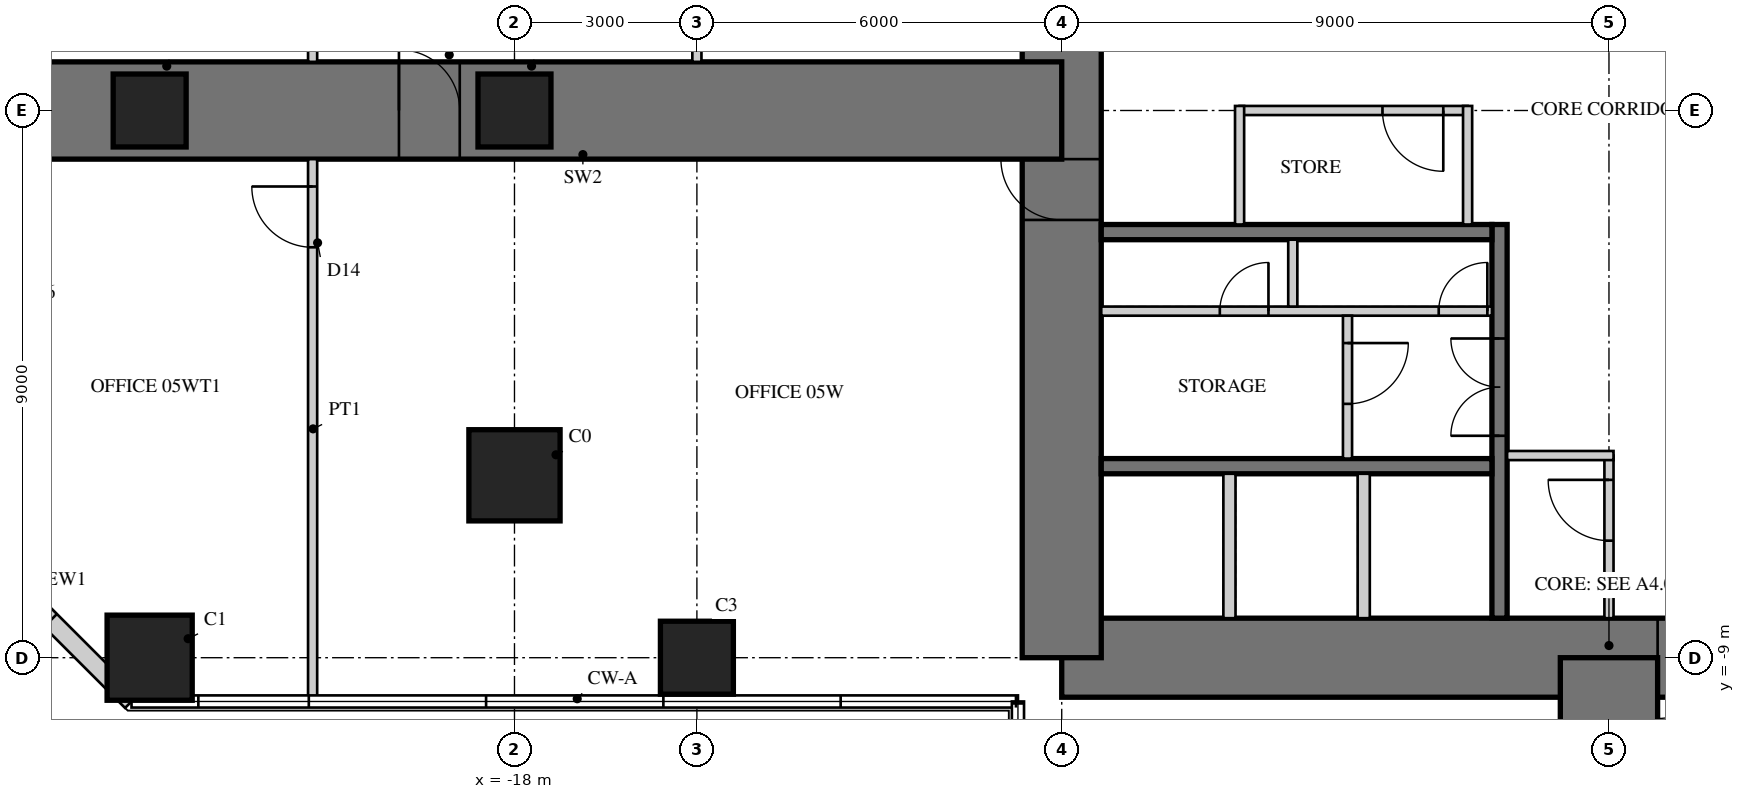
"""IFC4 building model, lengths in metres.
Left out: names, types, materials, properties, quantities, classifications, styles, units other than length and angle.
Written with IfcOpenShell. Run it as: python <this file> out.ifc"""

import sys

from ifc_helpers import new_model, si_unit, direction, frame, frame_2d, origin, origin_2d, place, context, subcontext, project, spatial, rectangle, extrude, element, fill, save


model = new_model("IFC4")
c1 = context("Model", 3, precision=1e-05, world=origin(), true_north=direction((0.0, 1.0)))
c2 = subcontext(c1, "Body", "Model", "MODEL_VIEW")
j1 = project(units=[si_unit("LENGTHUNIT", "METRE"), si_unit("PLANEANGLEUNIT", "RADIAN")], contexts=[c1])
p1 = place(None, origin())
s1 = spatial("IfcSite", under=j1, at=p1, CompositionType="ELEMENT")
p2 = place(p1, origin())
s2 = spatial("IfcBuilding", under=s1, at=p2, CompositionType="ELEMENT")
p3 = place(p2, frame((0.0, 0.0, 23.5)))
s3 = spatial("IfcBuildingStorey", under=s2, at=p3, CompositionType="ELEMENT", Elevation=23.5)
p4 = place(p3, frame((-9.0, -9.0, 0.0), z_axis=(0.0, 0.0, 1.0), x_axis=(1.0, 0.0, 0.0)))
e1 = element("IfcWall", 1, at=p4, inside=s3, PredefinedType="SHEAR", context=c2, shape_type="SweptSolid", body=[
    extrude(rectangle(XDim=18.0, YDim=1.3, at=frame_2d((9.0, 0.0))), origin(), (0.0, 0.0, 1.0), 4.0),
])
p5 = place(p4, frame((9.8, 0.0, 0.0)))
e2 = element("IfcOpeningElement", 2, at=p5, cuts=e1, PredefinedType="OPENING", context=c2, shape_type="SweptSolid", body=[
    extrude(rectangle(XDim=1.0, YDim=2.4, at=frame_2d((0.5, 1.2))), frame((0.0, 0.66, 0.0), z_axis=(0.0, -1.0, 0.0), x_axis=(1.0, 0.0, 0.0)), (0.0, 0.0, 1.0), 1.32),
])
p6 = place(p3, frame((-9.0, 9.0, 0.0), z_axis=(0.0, 0.0, 1.0), x_axis=(0.0, -1.0, 0.0)))
e3 = element("IfcWall", 3, at=p6, inside=s3, PredefinedType="SHEAR", context=c2, shape_type="SweptSolid", body=[
    extrude(rectangle(XDim=18.0, YDim=1.3, at=frame_2d((9.0, 0.0))), origin(), (0.0, 0.0, 1.0), 4.0),
])
p7 = place(p6, frame((9.8, 0.0, 0.0)))
e4 = element("IfcOpeningElement", 4, at=p7, cuts=e3, PredefinedType="OPENING", context=c2, shape_type="SweptSolid", body=[
    extrude(rectangle(XDim=1.0, YDim=2.4, at=frame_2d((0.5, 1.2))), frame((0.0, 0.66, 0.0), z_axis=(0.0, -1.0, 0.0), x_axis=(1.0, 0.0, 0.0)), (0.0, 0.0, 1.0), 1.32),
])
p8 = place(p3, frame((-1.8, -1.875, 0.0), z_axis=(0.0, 0.0, 1.0), x_axis=(0.0, -1.0, 0.0)))
e5 = element("IfcWall", 5, at=p8, inside=s3, PredefinedType="SHEAR", context=c2, shape_type="SweptSolid", body=[
    extrude(rectangle(XDim=6.475, YDim=0.25, at=frame_2d((3.238, 0.0))), origin(), (0.0, 0.0, 1.0), 4.0),
])
p9 = place(p8, frame((1.875, 0.0, 0.0)))
e6 = element("IfcOpeningElement", 6, at=p9, cuts=e5, PredefinedType="OPENING", context=c2, shape_type="SweptSolid", body=[
    extrude(rectangle(XDim=1.6, YDim=2.4, at=frame_2d((0.8, 1.2))), frame((0.0, 0.135, 0.0), z_axis=(0.0, -1.0, 0.0), x_axis=(1.0, 0.0, 0.0)), (0.0, 0.0, 1.0), 0.27),
])
for number, where, z_axis, x_axis in (
    (7, (-1.925, -2.0, 0.0), (0.0, 0.0, 1.0), (-1.0, 0.0, 0.0)),
    (8, (-1.925, -5.85, 0.0), (0.0, 0.0, 1.0), (-1.0, 0.0, 0.0)),
):
    element("IfcWall", number, at=place(p3, frame(where, z_axis=z_axis, x_axis=x_axis)), inside=s3, PredefinedType="SHEAR", context=c2, shape_type="SweptSolid", body=[
        extrude(rectangle(XDim=6.425, YDim=0.25, at=frame_2d((3.212, 0.0))), origin(), (0.0, 0.0, 1.0), 4.0),
    ])
p10 = place(p3, frame((-1.925, -3.3, 0.0), z_axis=(0.0, 0.0, 1.0), x_axis=(-1.0, 0.0, 0.0)))
e9 = element("IfcWall", 9, at=p10, inside=s3, PredefinedType="PARTITIONING", context=c2, shape_type="SweptSolid", body=[
    extrude(rectangle(XDim=6.425, YDim=0.15, at=frame_2d((3.212, 0.0))), origin(), (0.0, 0.0, 1.0), 4.0),
])
p11 = place(p10, frame((0.075, 0.0, 0.0)))
e10 = element("IfcOpeningElement", 10, at=p11, cuts=e9, PredefinedType="OPENING", context=c2, shape_type="SweptSolid", body=[
    extrude(rectangle(XDim=0.8, YDim=2.1, at=frame_2d((0.4, 1.05))), frame((0.0, 0.085, 0.0), z_axis=(0.0, -1.0, 0.0), x_axis=(1.0, 0.0, 0.0)), (0.0, 0.0, 1.0), 0.17),
])
p12 = place(p10, frame((3.675, 0.0, 0.0)))
e11 = element("IfcOpeningElement", 11, at=p12, cuts=e9, PredefinedType="OPENING", context=c2, shape_type="SweptSolid", body=[
    extrude(rectangle(XDim=0.8, YDim=2.1, at=frame_2d((0.4, 1.05))), frame((0.0, 0.085, 0.0), z_axis=(0.0, -1.0, 0.0), x_axis=(1.0, 0.0, 0.0)), (0.0, 0.0, 1.0), 0.17),
])
p13 = place(p3, frame((-5.2, -2.125, 0.0), z_axis=(0.0, 0.0, 1.0), x_axis=(0.0, -1.0, 0.0)))
e12 = element("IfcWall", 12, at=p13, inside=s3, PredefinedType="PARTITIONING", context=c2, shape_type="SweptSolid", body=[
    extrude(rectangle(XDim=1.1, YDim=0.15, at=frame_2d((0.55, 0.0))), origin(), (0.0, 0.0, 1.0), 4.0),
])
for number, where, z_axis, x_axis in (
    (13, (-4.033, -5.975, 0.0), (0.0, 0.0, 1.0), (0.0, -1.0, 0.0)),
    (14, (-6.242, -5.975, 0.0), (0.0, 0.0, 1.0), (0.0, -1.0, 0.0)),
):
    element("IfcWall", number, at=place(p3, frame(where, z_axis=z_axis, x_axis=x_axis)), inside=s3, PredefinedType="PARTITIONING", context=c2, shape_type="SweptSolid", body=[
        extrude(rectangle(XDim=2.375, YDim=0.2, at=frame_2d((1.188, 0.0))), origin(), (0.0, 0.0, 1.0), 4.0),
    ])
p14 = place(p3, frame((0.0, -9.0, 0.0), z_axis=(0.0, 0.0, 1.0), x_axis=(0.0, -1.0, 0.0)))
e15 = element("IfcWall", 15, at=p14, inside=s3, PredefinedType="SHEAR", context=c2, shape_type="SweptSolid", body=[
    extrude(rectangle(XDim=18.0, YDim=1.6, at=frame_2d((9.0, 0.0))), origin(), (0.0, 0.0, 1.0), 4.0),
])
p15 = place(p14, frame((9.9, 0.0, 0.0)))
e16 = element("IfcOpeningElement", 16, at=p15, cuts=e15, PredefinedType="OPENING", context=c2, shape_type="SweptSolid", body=[
    extrude(rectangle(XDim=1.0, YDim=2.2, at=frame_2d((0.5, 1.1))), frame((0.0, 0.81, 0.0), z_axis=(0.0, -1.0, 0.0), x_axis=(1.0, 0.0, 0.0)), (0.0, 0.0, 1.0), 1.62),
])
p16 = place(p3, frame((-9.0, 0.0, 0.0), z_axis=(0.0, 0.0, 1.0), x_axis=(-1.0, 0.0, 0.0)))
e17 = element("IfcWall", 17, at=p16, inside=s3, PredefinedType="SHEAR", context=c2, shape_type="SweptSolid", body=[
    extrude(rectangle(XDim=18.0, YDim=1.6, at=frame_2d((9.0, 0.0))), origin(), (0.0, 0.0, 1.0), 4.0),
])
p17 = place(p16, frame((9.9, 0.0, 0.0)))
e18 = element("IfcOpeningElement", 18, at=p17, cuts=e17, PredefinedType="OPENING", context=c2, shape_type="SweptSolid", body=[
    extrude(rectangle(XDim=1.0, YDim=2.2, at=frame_2d((0.5, 1.1))), frame((0.0, 0.81, 0.0), z_axis=(0.0, -1.0, 0.0), x_axis=(1.0, 0.0, 0.0)), (0.0, 0.0, 1.0), 1.62),
])
p18 = place(p3, frame((-15.0, -9.0, 0.0), z_axis=(0.0, 0.0, 1.0), x_axis=(1.0, 0.0, 0.0)))
e19 = element("IfcColumn", 19, at=p18, inside=s3, PredefinedType="COLUMN", context=c2, shape_type="SweptSolid", body=[
    extrude(rectangle(XDim=1.2, YDim=1.2, at=origin_2d()), origin(), (0.0, 0.0, 1.0), 4.0),
])
p19 = place(p3, frame((-24.0, -9.0, 0.0), z_axis=(0.0, 0.0, 1.0), x_axis=(1.0, 0.0, 0.0)))
e20 = element("IfcColumn", 20, at=p19, inside=s3, PredefinedType="COLUMN", context=c2, shape_type="SweptSolid", body=[
    extrude(rectangle(XDim=1.4, YDim=1.4, at=origin_2d()), origin(), (0.0, 0.0, 1.0), 4.0),
])
p20 = place(p3, frame((-18.0, 0.0, 0.0), z_axis=(0.0, 0.0, 1.0), x_axis=(1.0, 0.0, 0.0)))
e21 = element("IfcColumn", 21, at=p20, inside=s3, PredefinedType="COLUMN", context=c2, shape_type="SweptSolid", body=[
    extrude(rectangle(XDim=1.2, YDim=1.2, at=origin_2d()), origin(), (0.0, 0.0, 1.0), 4.0),
])
p21 = place(p3, frame((-18.0, -6.0, -0.2), z_axis=(0.0, 0.0, 1.0), x_axis=(1.0, 0.0, 0.0)))
e22 = element("IfcColumn", 22, at=p21, inside=s3, PredefinedType="COLUMN", context=c2, shape_type="SweptSolid", body=[
    extrude(rectangle(XDim=1.5, YDim=1.5, at=origin_2d()), origin(), (0.0, 0.0, 1.0), 4.2),
])
p22 = place(p3, frame((-24.0, 0.0, 0.0), z_axis=(0.0, 0.0, 1.0), x_axis=(1.0, 0.0, 0.0)))
e23 = element("IfcColumn", 23, at=p22, inside=s3, PredefinedType="COLUMN", context=c2, shape_type="SweptSolid", body=[
    extrude(rectangle(XDim=1.2, YDim=1.2, at=origin_2d()), origin(), (0.0, 0.0, 1.0), 4.0),
])
p23 = place(p3, frame((-27.6, -6.418, 0.0), z_axis=(0.0, 0.0, 1.0), x_axis=(0.707106781187, -0.707106781187, 0.0)))
e24 = element("IfcWall", 24, at=p23, inside=s3, PredefinedType="SOLIDWALL", context=c2, shape_type="SweptSolid", body=[
    extrude(rectangle(XDim=4.669, YDim=0.3, at=frame_2d((2.335, 0.0))), origin(), (0.0, 0.0, 1.0), 3.8),
])
p24 = place(p23, frame((1.885, 0.0, 0.3)))
e25 = element("IfcOpeningElement", 25, at=p24, cuts=e24, PredefinedType="OPENING", context=c2, shape_type="SweptSolid", body=[
    extrude(rectangle(XDim=0.9, YDim=2.4, at=frame_2d((0.45, 1.2))), frame((0.0, 0.16, 0.0), z_axis=(0.0, -1.0, 0.0), x_axis=(1.0, 0.0, 0.0)), (0.0, 0.0, 1.0), 0.32),
])
p25 = place(p3, frame((-2.325, 0.0, 0.0), z_axis=(0.0, 0.0, 1.0), x_axis=(-1.0, 0.0, 0.0)))
e26 = element("IfcWall", 26, at=p25, inside=s3, PredefinedType="PARTITIONING", context=c2, shape_type="SweptSolid", body=[
    extrude(rectangle(XDim=3.75, YDim=0.15, at=frame_2d((1.875, 0.0))), origin(), (0.0, 0.0, 1.0), 3.8),
])
p26 = place(p25, frame((0.4, 0.0, 0.0)))
e27 = element("IfcOpeningElement", 27, at=p26, cuts=e26, PredefinedType="OPENING", context=c2, shape_type="SweptSolid", body=[
    extrude(rectangle(XDim=1.0, YDim=2.1, at=frame_2d((0.5, 1.05))), frame((0.0, 0.085, 0.0), z_axis=(0.0, -1.0, 0.0), x_axis=(1.0, 0.0, 0.0)), (0.0, 0.0, 1.0), 0.17),
])
for number, where, z_axis, x_axis in (
    (28, (-2.325, -1.875, 0.0), (0.0, 0.0, 1.0), (0.0, 1.0, 0.0)),
    (29, (-6.075, 0.075, 0.0), (0.0, 0.0, 1.0), (0.0, -1.0, 0.0)),
):
    element("IfcWall", number, at=place(p3, frame(where, z_axis=z_axis, x_axis=x_axis)), inside=s3, PredefinedType="PARTITIONING", context=c2, shape_type="SweptSolid", body=[
        extrude(rectangle(XDim=1.95, YDim=0.15, at=frame_2d((0.975, 0.0))), origin(), (0.0, 0.0, 1.0), 3.8),
    ])
p27 = place(p3, frame((0.0, -5.675, 0.0), z_axis=(0.0, 0.0, 1.0), x_axis=(0.0, -1.0, 0.0)))
e30 = element("IfcWall", 30, at=p27, inside=s3, PredefinedType="PARTITIONING", context=c2, shape_type="SweptSolid", body=[
    extrude(rectangle(XDim=2.675, YDim=0.15, at=frame_2d((1.337, 0.0))), origin(), (0.0, 0.0, 1.0), 3.8),
])
p28 = place(p27, frame((0.4, 0.0, 0.0)))
e31 = element("IfcOpeningElement", 31, at=p28, cuts=e30, PredefinedType="OPENING", context=c2, shape_type="SweptSolid", body=[
    extrude(rectangle(XDim=1.0, YDim=2.1, at=frame_2d((0.5, 1.05))), frame((0.0, 0.085, 0.0), z_axis=(0.0, -1.0, 0.0), x_axis=(1.0, 0.0, 0.0)), (0.0, 0.0, 1.0), 0.17),
])
p29 = place(p3, frame((-1.675, -5.675, 0.0), z_axis=(0.0, 0.0, 1.0), x_axis=(1.0, 0.0, 0.0)))
e32 = element("IfcWall", 32, at=p29, inside=s3, PredefinedType="PARTITIONING", context=c2, shape_type="SweptSolid", body=[
    extrude(rectangle(XDim=1.75, YDim=0.15, at=frame_2d((0.875, 0.0))), origin(), (0.0, 0.0, 1.0), 3.8),
])
p30 = place(p3, frame((-4.3, -3.375, 0.0), z_axis=(0.0, 0.0, 1.0), x_axis=(0.0, -1.0, 0.0)))
e33 = element("IfcWall", 33, at=p30, inside=s3, PredefinedType="PARTITIONING", context=c2, shape_type="SweptSolid", body=[
    extrude(rectangle(XDim=2.35, YDim=0.15, at=frame_2d((1.175, 0.0))), origin(), (0.0, 0.0, 1.0), 3.8),
])
p31 = place(p30, frame((0.45, 0.0, 0.0)))
e34 = element("IfcOpeningElement", 34, at=p31, cuts=e33, PredefinedType="OPENING", context=c2, shape_type="SweptSolid", body=[
    extrude(rectangle(XDim=1.0, YDim=2.1, at=frame_2d((0.5, 1.05))), frame((0.0, 0.085, 0.0), z_axis=(0.0, -1.0, 0.0), x_axis=(1.0, 0.0, 0.0)), (0.0, 0.0, 1.0), 0.17),
])
p32 = place(p3, frame((-15.0, 8.4, 0.0), z_axis=(0.0, 0.0, 1.0), x_axis=(0.0, -1.0, 0.0)))
e35 = element("IfcWall", 35, at=p32, inside=s3, PredefinedType="PARTITIONING", context=c2, shape_type="SweptSolid", body=[
    extrude(rectangle(XDim=7.6, YDim=0.15, at=frame_2d((3.8, 0.0))), origin(), (0.0, 0.0, 1.0), 2.95),
])
p33 = place(p32, frame((0.75, 0.0, 0.0)))
e36 = element("IfcOpeningElement", 36, at=p33, cuts=e35, PredefinedType="OPENING", context=c2, shape_type="SweptSolid", body=[
    extrude(rectangle(XDim=1.0, YDim=2.1, at=frame_2d((0.5, 1.05))), frame((0.0, 0.085, 0.0), z_axis=(0.0, -1.0, 0.0), x_axis=(1.0, 0.0, 0.0)), (0.0, 0.0, 1.0), 0.17),
])
p34 = place(p32, frame((3.25, 0.0, 0.0)))
e37 = element("IfcOpeningElement", 37, at=p34, cuts=e35, PredefinedType="OPENING", context=c2, shape_type="SweptSolid", body=[
    extrude(rectangle(XDim=1.0, YDim=2.1, at=frame_2d((0.5, 1.05))), frame((0.0, 0.085, 0.0), z_axis=(0.0, -1.0, 0.0), x_axis=(1.0, 0.0, 0.0)), (0.0, 0.0, 1.0), 0.17),
])
p35 = place(p32, frame((5.8, 0.0, 0.0)))
e38 = element("IfcOpeningElement", 38, at=p35, cuts=e35, PredefinedType="OPENING", context=c2, shape_type="SweptSolid", body=[
    extrude(rectangle(XDim=1.0, YDim=2.1, at=frame_2d((0.5, 1.05))), frame((0.0, 0.085, 0.0), z_axis=(0.0, -1.0, 0.0), x_axis=(1.0, 0.0, 0.0)), (0.0, 0.0, 1.0), 0.17),
])
p36 = place(p3, frame((-21.32, -0.8, 0.0), z_axis=(0.0, 0.0, 1.0), x_axis=(0.0, -1.0, 0.0)))
e39 = element("IfcWall", 39, at=p36, inside=s3, PredefinedType="PARTITIONING", context=c2, shape_type="SweptSolid", body=[
    extrude(rectangle(XDim=8.88, YDim=0.15, at=frame_2d((4.44, 0.0))), origin(), (0.0, 0.0, 1.0), 3.8),
])
p37 = place(p36, frame((0.45, 0.0, 0.0)))
e40 = element("IfcOpeningElement", 40, at=p37, cuts=e39, PredefinedType="OPENING", context=c2, shape_type="SweptSolid", body=[
    extrude(rectangle(XDim=1.0, YDim=2.2, at=frame_2d((0.5, 1.1))), frame((0.0, 0.085, 0.0), z_axis=(0.0, -1.0, 0.0), x_axis=(1.0, 0.0, 0.0)), (0.0, 0.0, 1.0), 0.17),
])
p38 = place(p3, frame((-21.32, 9.68, 0.0), z_axis=(0.0, 0.0, 1.0), x_axis=(0.0, -1.0, 0.0)))
e41 = element("IfcWall", 41, at=p38, inside=s3, PredefinedType="PARTITIONING", context=c2, shape_type="SweptSolid", body=[
    extrude(rectangle(XDim=8.88, YDim=0.15, at=frame_2d((4.44, 0.0))), origin(), (0.0, 0.0, 1.0), 3.8),
])
p39 = place(p38, frame((7.43, 0.0, 0.0)))
e42 = element("IfcOpeningElement", 42, at=p39, cuts=e41, PredefinedType="OPENING", context=c2, shape_type="SweptSolid", body=[
    extrude(rectangle(XDim=1.0, YDim=2.2, at=frame_2d((0.5, 1.1))), frame((0.0, 0.085, 0.0), z_axis=(0.0, -1.0, 0.0), x_axis=(1.0, 0.0, 0.0)), (0.0, 0.0, 1.0), 0.17),
])
p40 = place(p26, origin())
e43 = element("IfcDoor", 43, at=p40, inside=s3, OperationType="SINGLE_SWING_LEFT", PredefinedType="DOOR", context=c2, shape_type="SweptSolid", body=[
    extrude(rectangle(XDim=1.0, YDim=2.1, at=frame_2d((0.5, 1.05))), frame((0.0, 0.025, 0.0), z_axis=(0.0, -1.0, 0.0), x_axis=(1.0, 0.0, 0.0)), (0.0, 0.0, 1.0), 0.05),
])
fill(e27, e43)
p41 = place(p28, frame((1.0, 0.0, 0.0), z_axis=(0.0, 0.0, 1.0), x_axis=(-1.0, 0.0, 0.0)))
e44 = element("IfcDoor", 44, at=p41, inside=s3, OperationType="SINGLE_SWING_RIGHT", PredefinedType="DOOR", context=c2, shape_type="SweptSolid", body=[
    extrude(rectangle(XDim=1.0, YDim=2.1, at=frame_2d((0.5, 1.05))), frame((0.0, 0.025, 0.0), z_axis=(0.0, -1.0, 0.0), x_axis=(1.0, 0.0, 0.0)), (0.0, 0.0, 1.0), 0.05),
])
fill(e31, e44)
p42 = place(p31, origin())
e45 = element("IfcDoor", 45, at=p42, inside=s3, OperationType="SINGLE_SWING_LEFT", PredefinedType="DOOR", context=c2, shape_type="SweptSolid", body=[
    extrude(rectangle(XDim=1.0, YDim=2.1, at=frame_2d((0.5, 1.05))), frame((0.0, 0.025, 0.0), z_axis=(0.0, -1.0, 0.0), x_axis=(1.0, 0.0, 0.0)), (0.0, 0.0, 1.0), 0.05),
])
fill(e34, e45)
p43 = place(p37, frame((1.0, 0.0, 0.0), z_axis=(0.0, 0.0, 1.0), x_axis=(-1.0, 0.0, 0.0)))
e46 = element("IfcDoor", 46, at=p43, inside=s3, OperationType="SINGLE_SWING_RIGHT", PredefinedType="DOOR", context=c2, shape_type="SweptSolid", body=[
    extrude(rectangle(XDim=1.0, YDim=2.2, at=frame_2d((0.5, 1.1))), frame((0.0, 0.025, 0.0), z_axis=(0.0, -1.0, 0.0), x_axis=(1.0, 0.0, 0.0)), (0.0, 0.0, 1.0), 0.05),
])
fill(e40, e46)
p44 = place(p17, frame((1.0, 0.0, 0.0), z_axis=(0.0, 0.0, 1.0), x_axis=(-1.0, 0.0, 0.0)))
e47 = element("IfcDoor", 47, at=p44, inside=s3, OperationType="SINGLE_SWING_LEFT", PredefinedType="DOOR", context=c2, shape_type="SweptSolid", body=[
    extrude(rectangle(XDim=1.0, YDim=2.2, at=frame_2d((0.5, 1.1))), frame((0.0, 0.025, 0.0), z_axis=(0.0, -1.0, 0.0), x_axis=(1.0, 0.0, 0.0)), (0.0, 0.0, 1.0), 0.05),
])
fill(e18, e47)
p45 = place(p5, frame((1.0, 0.0, 0.0), z_axis=(0.0, 0.0, 1.0), x_axis=(-1.0, 0.0, 0.0)))
e48 = element("IfcDoor", 48, at=p45, inside=s3, OperationType="SINGLE_SWING_RIGHT", PredefinedType="DOOR", context=c2, shape_type="SweptSolid", body=[
    extrude(rectangle(XDim=1.0, YDim=2.4, at=frame_2d((0.5, 1.2))), frame((0.0, -0.005, 0.0), z_axis=(0.0, -1.0, 0.0), x_axis=(1.0, 0.0, 0.0)), (0.0, 0.0, 1.0), 0.05),
])
fill(e2, e48)
p46 = place(p7, frame((1.0, 0.0, 0.0), z_axis=(0.0, 0.0, 1.0), x_axis=(-1.0, 0.0, 0.0)))
e49 = element("IfcDoor", 49, at=p46, inside=s3, OperationType="SINGLE_SWING_RIGHT", PredefinedType="DOOR", context=c2, shape_type="SweptSolid", body=[
    extrude(rectangle(XDim=1.0, YDim=2.4, at=frame_2d((0.5, 1.2))), frame((0.0, -0.005, 0.0), z_axis=(0.0, -1.0, 0.0), x_axis=(1.0, 0.0, 0.0)), (0.0, 0.0, 1.0), 0.05),
])
fill(e4, e49)
p47 = place(p9, frame((1.6, 0.0, 0.0), z_axis=(0.0, 0.0, 1.0), x_axis=(-1.0, 0.0, 0.0)))
e50 = element("IfcDoor", 50, at=p47, inside=s3, OperationType="DOUBLE_DOOR_SINGLE_SWING", PredefinedType="DOOR", context=c2, shape_type="SweptSolid", body=[
    extrude(rectangle(XDim=1.6, YDim=2.4, at=frame_2d((0.8, 1.2))), frame((0.0, 0.025, 0.0), z_axis=(0.0, -1.0, 0.0), x_axis=(1.0, 0.0, 0.0)), (0.0, 0.0, 1.0), 0.05),
])
fill(e6, e50)
p48 = place(p11, frame((0.8, 0.0, 0.0), z_axis=(0.0, 0.0, 1.0), x_axis=(-1.0, 0.0, 0.0)))
e51 = element("IfcDoor", 51, at=p48, inside=s3, OperationType="SINGLE_SWING_RIGHT", PredefinedType="DOOR", context=c2, shape_type="SweptSolid", body=[
    extrude(rectangle(XDim=0.8, YDim=2.1, at=frame_2d((0.4, 1.05))), frame((0.0, 0.025, 0.0), z_axis=(0.0, -1.0, 0.0), x_axis=(1.0, 0.0, 0.0)), (0.0, 0.0, 1.0), 0.05),
])
fill(e10, e51)
p49 = place(p12, frame((0.8, 0.0, 0.0), z_axis=(0.0, 0.0, 1.0), x_axis=(-1.0, 0.0, 0.0)))
e52 = element("IfcDoor", 52, at=p49, inside=s3, OperationType="SINGLE_SWING_RIGHT", PredefinedType="DOOR", context=c2, shape_type="SweptSolid", body=[
    extrude(rectangle(XDim=0.8, YDim=2.1, at=frame_2d((0.4, 1.05))), frame((0.0, 0.025, 0.0), z_axis=(0.0, -1.0, 0.0), x_axis=(1.0, 0.0, 0.0)), (0.0, 0.0, 1.0), 0.05),
])
fill(e11, e52)
save(model, sys.argv[1])
